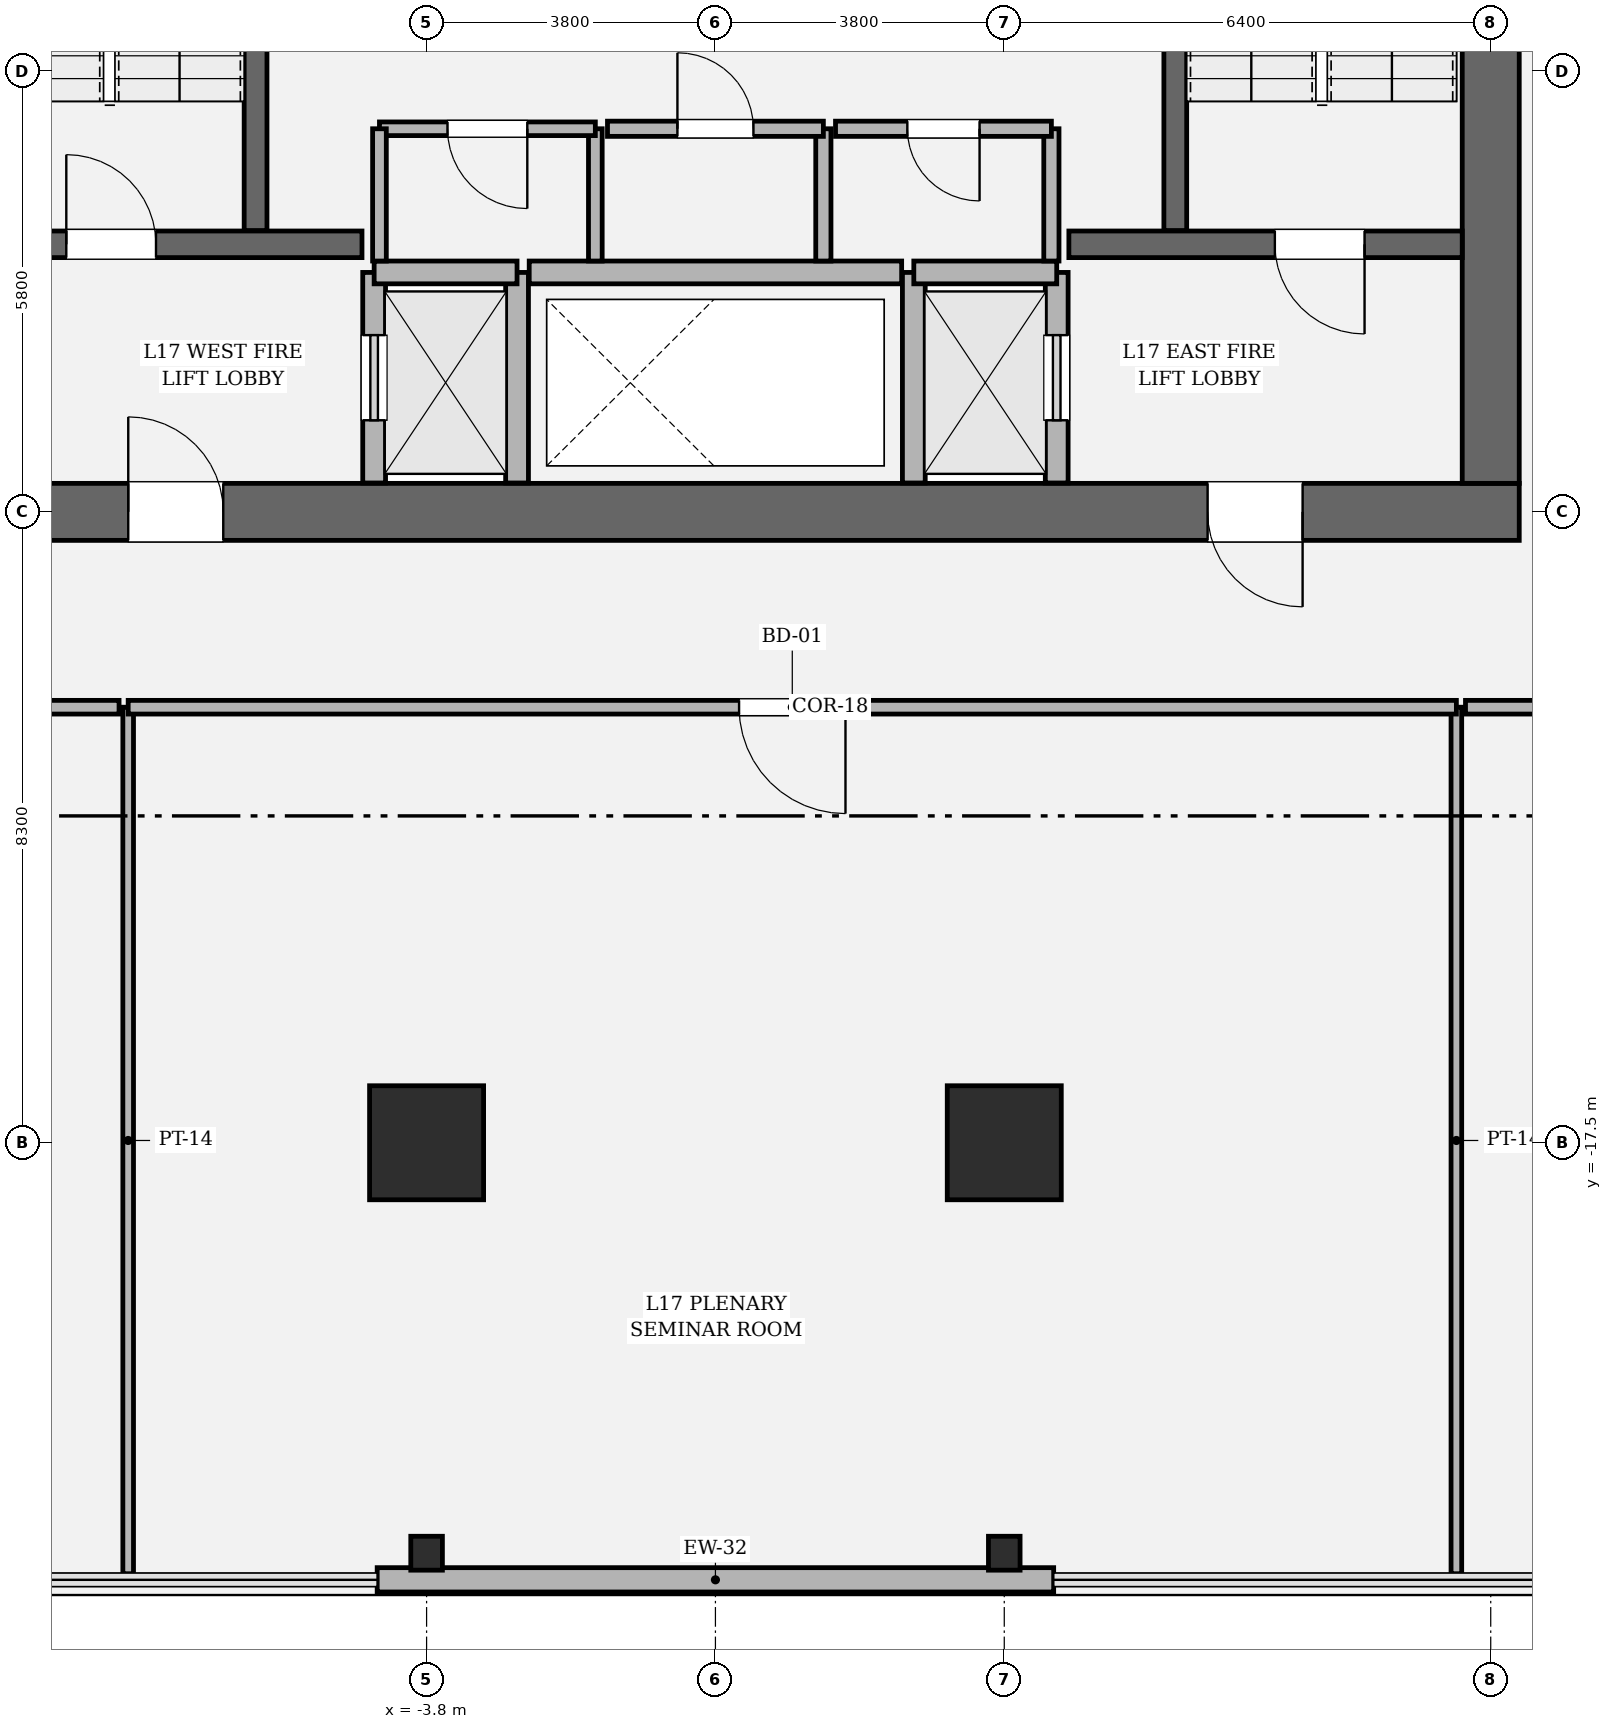
"""IFC4 building model, lengths in metres.
Left out: names, types, materials, properties, quantities, classifications, styles, units other than length and angle.
Written with IfcOpenShell. Run it as: python <this file> out.ifc"""

import sys

from ifc_helpers import new_model, si_unit, direction, frame, frame_2d, origin, origin_2d, place, context, subcontext, project, spatial, rectangle, hollow_rectangle, i_section, extrude, element, fill, save


model = new_model("IFC4")
c1 = context("Model", 3, precision=1e-05, world=origin(), true_north=direction((0.0, 1.0)))
c2 = subcontext(c1, "Body", "Model", "MODEL_VIEW")
j1 = project(units=[si_unit("LENGTHUNIT", "METRE"), si_unit("PLANEANGLEUNIT", "RADIAN")], contexts=[c1])
p1 = place(None, origin())
s1 = spatial("IfcSite", under=j1, at=p1, CompositionType="ELEMENT")
p2 = place(p1, origin())
s2 = spatial("IfcBuilding", under=s1, at=p2, CompositionType="ELEMENT")
p3 = place(p2, frame((0.0, 0.0, 76.8)))
s3 = spatial("IfcBuildingStorey", under=s2, at=p3, CompositionType="ELEMENT", Elevation=76.8)
p4 = place(p3, frame((10.575, -9.2, 0.0), z_axis=(0.0, 0.0, 1.0), x_axis=(-1.0, 0.0, 0.0)))
e1 = element("IfcWall", 1, at=p4, inside=s3, PredefinedType="SHEAR", context=c2, shape_type="SweptSolid", body=[
    extrude(rectangle(XDim=21.15, YDim=0.75, at=frame_2d((10.575, 0.0))), origin(), (0.0, 0.0, 1.0), 4.05),
])
p5 = place(p4, frame((2.85, 0.0, 0.0)))
e2 = element("IfcOpeningElement", 2, at=p5, cuts=e1, PredefinedType="OPENING", context=c2, shape_type="SweptSolid", body=[
    extrude(rectangle(XDim=1.25, YDim=2.25, at=frame_2d((0.625, 1.125))), frame((0.0, 0.385, 0.0), z_axis=(0.0, -1.0, 0.0), x_axis=(1.0, 0.0, 0.0)), (0.0, 0.0, 1.0), 0.77),
])
p6 = place(p4, frame((17.05, 0.0, 0.0)))
e3 = element("IfcOpeningElement", 3, at=p6, cuts=e1, PredefinedType="OPENING", context=c2, shape_type="SweptSolid", body=[
    extrude(rectangle(XDim=1.25, YDim=2.25, at=frame_2d((0.625, 1.125))), frame((0.0, 0.385, 0.0), z_axis=(0.0, -1.0, 0.0), x_axis=(1.0, 0.0, 0.0)), (0.0, 0.0, 1.0), 0.77),
])
p7 = place(p3, frame((10.2, 8.825, 0.0), z_axis=(0.0, 0.0, 1.0), x_axis=(0.0, -1.0, 0.0)))
e4 = element("IfcWall", 4, at=p7, inside=s3, PredefinedType="SHEAR", context=c2, shape_type="SweptSolid", body=[
    extrude(rectangle(XDim=17.65, YDim=0.75, at=frame_2d((8.825, 0.0))), origin(), (0.0, 0.0, 1.0), 4.05),
])
p8 = place(p7, frame((3.855, 0.0, 0.0)))
e5 = element("IfcOpeningElement", 5, at=p8, cuts=e4, PredefinedType="OPENING", context=c2, shape_type="SweptSolid", body=[
    extrude(rectangle(XDim=1.18, YDim=2.2, at=frame_2d((0.59, 1.1))), frame((0.0, 0.385, 0.0), z_axis=(0.0, -1.0, 0.0), x_axis=(1.0, 0.0, 0.0)), (0.0, 0.0, 1.0), 0.77),
])
for number, where, z_axis, x_axis in (
    (6, (-6.05, -5.5, 0.0), (0.0, 0.0, 1.0), (0.0, 1.0, 0.0)),
    (7, (6.05, 3.45, 0.0), (0.0, 0.0, 1.0), (0.0, -1.0, 0.0)),
):
    element("IfcWall", number, at=place(p3, frame(where, z_axis=z_axis, x_axis=x_axis)), inside=s3, PredefinedType="SOLIDWALL", context=c2, shape_type="SweptSolid", body=[
        extrude(rectangle(XDim=8.95, YDim=0.3, at=frame_2d((4.475, 0.0))), origin(), (0.0, 0.0, 1.0), 4.05),
    ])
p9 = place(p3, frame((-9.825, -5.68, 0.0), z_axis=(0.0, 0.0, 1.0), x_axis=(1.0, 0.0, 0.0)))
e8 = element("IfcWall", 8, at=p9, inside=s3, PredefinedType="SOLIDWALL", context=c2, shape_type="SweptSolid", body=[
    extrude(rectangle(XDim=5.175, YDim=0.35, at=frame_2d((2.587, 0.0))), origin(), (0.0, 0.0, 1.0), 4.05),
])
p10 = place(p9, frame((1.285, 0.0, 0.0)))
e9 = element("IfcOpeningElement", 9, at=p10, cuts=e8, PredefinedType="OPENING", context=c2, shape_type="SweptSolid", body=[
    extrude(rectangle(XDim=1.18, YDim=2.2, at=frame_2d((0.59, 1.1))), frame((0.0, 0.185, 0.0), z_axis=(0.0, -1.0, 0.0), x_axis=(1.0, 0.0, 0.0)), (0.0, 0.0, 1.0), 0.37),
])
p11 = place(p3, frame((4.65, -5.68, 0.0), z_axis=(0.0, 0.0, 1.0), x_axis=(1.0, 0.0, 0.0)))
e10 = element("IfcWall", 10, at=p11, inside=s3, PredefinedType="SOLIDWALL", context=c2, shape_type="SweptSolid", body=[
    extrude(rectangle(XDim=5.175, YDim=0.35, at=frame_2d((2.587, 0.0))), origin(), (0.0, 0.0, 1.0), 4.05),
])
p12 = place(p11, frame((2.71, 0.0, 0.0)))
e11 = element("IfcOpeningElement", 11, at=p12, cuts=e10, PredefinedType="OPENING", context=c2, shape_type="SweptSolid", body=[
    extrude(rectangle(XDim=1.18, YDim=2.2, at=frame_2d((0.59, 1.1))), frame((0.0, 0.185, 0.0), z_axis=(0.0, -1.0, 0.0), x_axis=(1.0, 0.0, 0.0)), (0.0, 0.0, 1.0), 0.37),
])
for number, where, z_axis, x_axis in (
    (12, (-3.8, -17.5, 0.0), (0.0, 0.0, 1.0), (1.0, 0.0, 0.0)),
    (13, (3.8, -17.5, 0.0), (0.0, 0.0, 1.0), (1.0, 0.0, 0.0)),
):
    element("IfcColumn", number, at=place(p3, frame(where, z_axis=z_axis, x_axis=x_axis)), inside=s3, PredefinedType="COLUMN", context=c2, shape_type="SweptSolid", body=[
        extrude(hollow_rectangle(XDim=1.5, YDim=1.5, WallThickness=0.045, at=origin_2d()), origin(), (0.0, 0.0, 1.0), 4.05),
    ])
for number, where, z_axis, x_axis in (
    (14, (-3.8, -22.9, 0.0), (0.0, 0.0, 1.0), (1.0, 0.0, 0.0)),
    (15, (3.8, -22.9, 0.0), (0.0, 0.0, 1.0), (1.0, 0.0, 0.0)),
):
    element("IfcColumn", number, at=place(p3, frame(where, z_axis=z_axis, x_axis=x_axis)), inside=s3, PredefinedType="COLUMN", context=c2, shape_type="SweptSolid", body=[
        extrude(i_section(OverallWidth=0.416, OverallDepth=0.446, WebThickness=0.039, FlangeThickness=0.062, FilletRadius=0.018, at=origin_2d()), origin(), (0.0, 0.0, 1.0), 4.048),
    ])
p13 = place(p3, frame((-4.45, -23.25, 0.0), z_axis=(0.0, 0.0, 1.0), x_axis=(1.0, 0.0, 0.0)))
e16 = element("IfcWall", 16, at=p13, inside=s3, PredefinedType="SOLIDWALL", context=c2, shape_type="SweptSolid", body=[
    extrude(rectangle(XDim=8.9, YDim=0.32, at=frame_2d((4.45, 0.0))), origin(), (0.0, 0.0, 1.0), 2.524),
])
p14 = place(p3, frame((-4.49, -8.82, 0.0), z_axis=(0.0, 0.0, 1.0), x_axis=(0.0, 1.0, 0.0)))
e17 = element("IfcWall", 17, at=p14, inside=s3, PredefinedType="SOLIDWALL", context=c2, shape_type="SweptSolid", body=[
    extrude(rectangle(XDim=2.77, YDim=0.3, at=frame_2d((1.385, 0.0))), origin(), (0.0, 0.0, 1.0), 3.81),
])
p15 = place(p14, frame((0.825, 0.0, 0.0)))
e18 = element("IfcOpeningElement", 18, at=p15, cuts=e17, PredefinedType="OPENING", context=c2, shape_type="SweptSolid", body=[
    extrude(rectangle(XDim=1.12, YDim=2.25, at=frame_2d((0.56, 1.125))), frame((0.0, 0.16, 0.0), z_axis=(0.0, -1.0, 0.0), x_axis=(1.0, 0.0, 0.0)), (0.0, 0.0, 1.0), 0.32),
])
p16 = place(p3, frame((-2.61, -8.82, 0.0), z_axis=(0.0, 0.0, 1.0), x_axis=(0.0, 1.0, 0.0)))
e19 = element("IfcWall", 19, at=p16, inside=s3, PredefinedType="SOLIDWALL", context=c2, shape_type="SweptSolid", body=[
    extrude(rectangle(XDim=2.77, YDim=0.3, at=frame_2d((1.385, 0.0))), origin(), (0.0, 0.0, 1.0), 3.81),
])
p17 = place(p3, frame((-4.49, -6.05, 0.0), z_axis=(0.0, 0.0, 1.0), x_axis=(1.0, 0.0, 0.0)))
e20 = element("IfcWall", 20, at=p17, inside=s3, PredefinedType="SOLIDWALL", context=c2, shape_type="SweptSolid", body=[
    extrude(rectangle(XDim=1.88, YDim=0.3, at=frame_2d((0.94, 0.0))), origin(), (0.0, 0.0, 1.0), 3.81),
])
p18 = place(p3, frame((4.49, -8.82, 0.0), z_axis=(0.0, 0.0, 1.0), x_axis=(0.0, 1.0, 0.0)))
e21 = element("IfcWall", 21, at=p18, inside=s3, PredefinedType="SOLIDWALL", context=c2, shape_type="SweptSolid", body=[
    extrude(rectangle(XDim=2.77, YDim=0.3, at=frame_2d((1.385, 0.0))), origin(), (0.0, 0.0, 1.0), 3.81),
])
p19 = place(p18, frame((0.825, 0.0, 0.0)))
e22 = element("IfcOpeningElement", 22, at=p19, cuts=e21, PredefinedType="OPENING", context=c2, shape_type="SweptSolid", body=[
    extrude(rectangle(XDim=1.12, YDim=2.25, at=frame_2d((0.56, 1.125))), frame((0.0, 0.16, 0.0), z_axis=(0.0, -1.0, 0.0), x_axis=(1.0, 0.0, 0.0)), (0.0, 0.0, 1.0), 0.32),
])
p20 = place(p3, frame((2.61, -8.82, 0.0), z_axis=(0.0, 0.0, 1.0), x_axis=(0.0, 1.0, 0.0)))
e23 = element("IfcWall", 23, at=p20, inside=s3, PredefinedType="SOLIDWALL", context=c2, shape_type="SweptSolid", body=[
    extrude(rectangle(XDim=2.77, YDim=0.3, at=frame_2d((1.385, 0.0))), origin(), (0.0, 0.0, 1.0), 3.81),
])
p21 = place(p3, frame((2.61, -6.05, 0.0), z_axis=(0.0, 0.0, 1.0), x_axis=(1.0, 0.0, 0.0)))
e24 = element("IfcWall", 24, at=p21, inside=s3, PredefinedType="SOLIDWALL", context=c2, shape_type="SweptSolid", body=[
    extrude(rectangle(XDim=1.88, YDim=0.3, at=frame_2d((0.94, 0.0))), origin(), (0.0, 0.0, 1.0), 3.81),
])
p22 = place(p3, frame((-2.45, -6.05, 0.0), z_axis=(0.0, 0.0, 1.0), x_axis=(1.0, 0.0, 0.0)))
e25 = element("IfcWall", 25, at=p22, inside=s3, PredefinedType="SOLIDWALL", context=c2, shape_type="SweptSolid", body=[
    extrude(rectangle(XDim=4.9, YDim=0.3, at=frame_2d((2.45, 0.0))), origin(), (0.0, 0.0, 1.0), 3.81),
])
p23 = place(p3, frame((-1.58, -5.9, 0.0), z_axis=(0.0, 0.0, 1.0), x_axis=(0.0, 1.0, 0.0)))
e26 = element("IfcWall", 26, at=p23, inside=s3, PredefinedType="PARTITIONING", context=c2, shape_type="SweptSolid", body=[
    extrude(rectangle(XDim=1.74, YDim=0.18, at=frame_2d((0.87, 0.0))), origin(), (0.0, 0.0, 1.0), 3.81),
])
p24 = place(p3, frame((-1.58, -4.16, 0.0), z_axis=(0.0, 0.0, 1.0), x_axis=(-1.0, 0.0, 0.0)))
e27 = element("IfcWall", 27, at=p24, inside=s3, PredefinedType="PARTITIONING", context=c2, shape_type="SweptSolid", body=[
    extrude(rectangle(XDim=2.84, YDim=0.18, at=frame_2d((1.42, 0.0))), origin(), (0.0, 0.0, 1.0), 3.81),
])
p25 = place(p24, frame((0.895, 0.0, 0.0)))
e28 = element("IfcOpeningElement", 28, at=p25, cuts=e27, PredefinedType="OPENING", context=c2, shape_type="SweptSolid", body=[
    extrude(rectangle(XDim=1.05, YDim=2.2, at=frame_2d((0.525, 1.1))), frame((0.0, 0.1, 0.0), z_axis=(0.0, -1.0, 0.0), x_axis=(1.0, 0.0, 0.0)), (0.0, 0.0, 1.0), 0.2),
])
p26 = place(p3, frame((-4.42, -4.16, 0.0), z_axis=(0.0, 0.0, 1.0), x_axis=(0.0, -1.0, 0.0)))
e29 = element("IfcWall", 29, at=p26, inside=s3, PredefinedType="PARTITIONING", context=c2, shape_type="SweptSolid", body=[
    extrude(rectangle(XDim=1.74, YDim=0.18, at=frame_2d((0.87, 0.0))), origin(), (0.0, 0.0, 1.0), 3.81),
])
p27 = place(p3, frame((1.42, -5.9, 0.0), z_axis=(0.0, 0.0, 1.0), x_axis=(0.0, 1.0, 0.0)))
e30 = element("IfcWall", 30, at=p27, inside=s3, PredefinedType="SOLIDWALL", context=c2, shape_type="SweptSolid", body=[
    extrude(rectangle(XDim=1.74, YDim=0.2, at=frame_2d((0.87, 0.0))), origin(), (0.0, 0.0, 1.0), 3.81),
])
p28 = place(p3, frame((1.42, -4.16, 0.0), z_axis=(0.0, 0.0, 1.0), x_axis=(-1.0, 0.0, 0.0)))
e31 = element("IfcWall", 31, at=p28, inside=s3, PredefinedType="SOLIDWALL", context=c2, shape_type="SweptSolid", body=[
    extrude(rectangle(XDim=2.84, YDim=0.2, at=frame_2d((1.42, 0.0))), origin(), (0.0, 0.0, 1.0), 3.81),
])
p29 = place(p28, frame((0.92, 0.0, 0.0)))
e32 = element("IfcOpeningElement", 32, at=p29, cuts=e31, PredefinedType="OPENING", context=c2, shape_type="SweptSolid", body=[
    extrude(rectangle(XDim=1.0, YDim=2.15, at=frame_2d((0.5, 1.075))), frame((0.0, 0.11, 0.0), z_axis=(0.0, -1.0, 0.0), x_axis=(1.0, 0.0, 0.0)), (0.0, 0.0, 1.0), 0.22),
])
p30 = place(p3, frame((4.42, -5.9, 0.0), z_axis=(0.0, 0.0, 1.0), x_axis=(0.0, 1.0, 0.0)))
e33 = element("IfcWall", 33, at=p30, inside=s3, PredefinedType="SOLIDWALL", context=c2, shape_type="SweptSolid", body=[
    extrude(rectangle(XDim=1.74, YDim=0.2, at=frame_2d((0.87, 0.0))), origin(), (0.0, 0.0, 1.0), 3.81),
])
p31 = place(p3, frame((4.42, -4.16, 0.0), z_axis=(0.0, 0.0, 1.0), x_axis=(-1.0, 0.0, 0.0)))
e34 = element("IfcWall", 34, at=p31, inside=s3, PredefinedType="SOLIDWALL", context=c2, shape_type="SweptSolid", body=[
    extrude(rectangle(XDim=2.84, YDim=0.2, at=frame_2d((1.42, 0.0))), origin(), (0.0, 0.0, 1.0), 3.81),
])
p32 = place(p31, frame((0.945, 0.0, 0.0)))
e35 = element("IfcOpeningElement", 35, at=p32, cuts=e34, PredefinedType="OPENING", context=c2, shape_type="SweptSolid", body=[
    extrude(rectangle(XDim=0.95, YDim=2.15, at=frame_2d((0.475, 1.075))), frame((0.0, 0.11, 0.0), z_axis=(0.0, -1.0, 0.0), x_axis=(1.0, 0.0, 0.0)), (0.0, 0.0, 1.0), 0.22),
])
for number, where, z_axis, x_axis in (
    (36, (9.748, -11.77, 0.0), (0.0, 0.0, 1.0), (0.0, -1.0, 0.0)),
    (37, (-7.726, -23.17, 0.0), (0.0, 0.0, 1.0), (0.0, 1.0, 0.0)),
):
    element("IfcWall", number, at=place(p3, frame(where, z_axis=z_axis, x_axis=x_axis)), inside=s3, PredefinedType="PARTITIONING", context=c2, shape_type="SweptSolid", body=[
        extrude(rectangle(XDim=11.4, YDim=0.14, at=frame_2d((5.7, 0.0))), origin(), (0.0, 0.0, 1.0), 2.524),
    ])
p33 = place(p3, frame((-7.726, -11.77, 0.0), z_axis=(0.0, 0.0, 1.0), x_axis=(1.0, 0.0, 0.0)))
e38 = element("IfcWall", 38, at=p33, inside=s3, PredefinedType="PARTITIONING", context=c2, shape_type="SweptSolid", body=[
    extrude(rectangle(XDim=17.474, YDim=0.18, at=frame_2d((8.737, 0.0))), origin(), (0.0, 0.0, 1.0), 3.104),
])
p34 = place(p33, frame((8.037, 0.0, 0.0)))
e39 = element("IfcOpeningElement", 39, at=p34, cuts=e38, PredefinedType="OPENING", context=c2, shape_type="SweptSolid", body=[
    extrude(rectangle(XDim=1.4, YDim=2.25, at=frame_2d((0.7, 1.125))), frame((0.0, 0.1, 0.0), z_axis=(0.0, -1.0, 0.0), x_axis=(1.0, 0.0, 0.0)), (0.0, 0.0, 1.0), 0.2),
])
p35 = place(p3, frame((-12.77, -11.77, 0.0), z_axis=(0.0, 0.0, 1.0), x_axis=(1.0, 0.0, 0.0)))
e40 = element("IfcWall", 40, at=p35, inside=s3, PredefinedType="PARTITIONING", context=c2, shape_type="SweptSolid", body=[
    extrude(rectangle(XDim=4.924, YDim=0.18, at=frame_2d((2.462, 0.0))), origin(), (0.0, 0.0, 1.0), 3.104),
])
p36 = place(p35, frame((1.762, 0.0, 0.0)))
e41 = element("IfcOpeningElement", 41, at=p36, cuts=e40, PredefinedType="OPENING", context=c2, shape_type="SweptSolid", body=[
    extrude(rectangle(XDim=1.4, YDim=2.25, at=frame_2d((0.7, 1.125))), frame((0.0, 0.1, 0.0), z_axis=(0.0, -1.0, 0.0), x_axis=(1.0, 0.0, 0.0)), (0.0, 0.0, 1.0), 0.2),
])
p37 = place(p3, frame((9.868, -11.77, 0.0), z_axis=(0.0, 0.0, 1.0), x_axis=(1.0, 0.0, 0.0)))
e42 = element("IfcWall", 42, at=p37, inside=s3, PredefinedType="PARTITIONING", context=c2, shape_type="SweptSolid", body=[
    extrude(rectangle(XDim=6.402, YDim=0.18, at=frame_2d((3.201, 0.0))), origin(), (0.0, 0.0, 1.0), 3.104),
])
p38 = place(p37, frame((2.501, 0.0, 0.0)))
e43 = element("IfcOpeningElement", 43, at=p38, cuts=e42, PredefinedType="OPENING", context=c2, shape_type="SweptSolid", body=[
    extrude(rectangle(XDim=1.4, YDim=2.25, at=frame_2d((0.7, 1.125))), frame((0.0, 0.1, 0.0), z_axis=(0.0, -1.0, 0.0), x_axis=(1.0, 0.0, 0.0)), (0.0, 0.0, 1.0), 0.2),
])
p39 = place(p10, origin())
e44 = element("IfcDoor", 44, at=p39, inside=s3, OperationType="SINGLE_SWING_LEFT", PredefinedType="DOOR", context=c2, shape_type="SweptSolid", body=[
    extrude(rectangle(XDim=1.18, YDim=2.2, at=frame_2d((0.59, 1.1))), frame((0.0, 0.025, 0.0), z_axis=(0.0, -1.0, 0.0), x_axis=(1.0, 0.0, 0.0)), (0.0, 0.0, 1.0), 0.05),
])
fill(e9, e44)
p40 = place(p12, origin())
e45 = element("IfcDoor", 45, at=p40, inside=s3, OperationType="SINGLE_SWING_RIGHT", PredefinedType="DOOR", context=c2, shape_type="SweptSolid", body=[
    extrude(rectangle(XDim=1.18, YDim=2.2, at=frame_2d((0.59, 1.1))), frame((0.0, 0.025, 0.0), z_axis=(0.0, -1.0, 0.0), x_axis=(1.0, 0.0, 0.0)), (0.0, 0.0, 1.0), 0.05),
])
fill(e11, e45)
p41 = place(p5, origin())
e46 = element("IfcDoor", 46, at=p41, inside=s3, OperationType="SINGLE_SWING_LEFT", PredefinedType="DOOR", context=c2, shape_type="SweptSolid", body=[
    extrude(rectangle(XDim=1.25, YDim=2.25, at=frame_2d((0.625, 1.125))), frame((0.0, 0.025, 0.0), z_axis=(0.0, -1.0, 0.0), x_axis=(1.0, 0.0, 0.0)), (0.0, 0.0, 1.0), 0.05),
])
fill(e2, e46)
p42 = place(p6, origin())
e47 = element("IfcDoor", 47, at=p42, inside=s3, OperationType="SINGLE_SWING_RIGHT", PredefinedType="DOOR", context=c2, shape_type="SweptSolid", body=[
    extrude(rectangle(XDim=1.25, YDim=2.25, at=frame_2d((0.625, 1.125))), frame((0.0, 0.025, 0.0), z_axis=(0.0, -1.0, 0.0), x_axis=(1.0, 0.0, 0.0)), (0.0, 0.0, 1.0), 0.05),
])
fill(e3, e47)
p43 = place(p15, origin())
e48 = element("IfcDoor", 48, at=p43, inside=s3, OperationType="SLIDING_TO_LEFT", PredefinedType="DOOR", context=c2, shape_type="SweptSolid", body=[
    extrude(rectangle(XDim=1.12, YDim=2.25, at=frame_2d((0.56, 1.125))), frame((0.0, 0.025, 0.0), z_axis=(0.0, -1.0, 0.0), x_axis=(1.0, 0.0, 0.0)), (0.0, 0.0, 1.0), 0.05),
])
fill(e18, e48)
p44 = place(p19, origin())
e49 = element("IfcDoor", 49, at=p44, inside=s3, OperationType="SLIDING_TO_RIGHT", PredefinedType="DOOR", context=c2, shape_type="SweptSolid", body=[
    extrude(rectangle(XDim=1.12, YDim=2.25, at=frame_2d((0.56, 1.125))), frame((0.0, 0.025, 0.0), z_axis=(0.0, -1.0, 0.0), x_axis=(1.0, 0.0, 0.0)), (0.0, 0.0, 1.0), 0.05),
])
fill(e22, e49)
p45 = place(p25, origin())
e50 = element("IfcDoor", 50, at=p45, inside=s3, OperationType="SINGLE_SWING_LEFT", PredefinedType="DOOR", context=c2, shape_type="SweptSolid", body=[
    extrude(rectangle(XDim=1.05, YDim=2.2, at=frame_2d((0.525, 1.1))), frame((0.0, 0.025, 0.0), z_axis=(0.0, -1.0, 0.0), x_axis=(1.0, 0.0, 0.0)), (0.0, 0.0, 1.0), 0.05),
])
fill(e28, e50)
p46 = place(p29, origin())
e51 = element("IfcDoor", 51, at=p46, inside=s3, OperationType="SINGLE_SWING_RIGHT", PredefinedType="DOOR", context=c2, shape_type="SweptSolid", body=[
    extrude(rectangle(XDim=1.0, YDim=2.15, at=frame_2d((0.5, 1.075))), frame((0.0, 0.025, 0.0), z_axis=(0.0, -1.0, 0.0), x_axis=(1.0, 0.0, 0.0)), (0.0, 0.0, 1.0), 0.05),
])
fill(e32, e51)
p47 = place(p32, origin())
e52 = element("IfcDoor", 52, at=p47, inside=s3, OperationType="SINGLE_SWING_LEFT", PredefinedType="DOOR", context=c2, shape_type="SweptSolid", body=[
    extrude(rectangle(XDim=0.95, YDim=2.15, at=frame_2d((0.475, 1.075))), frame((0.0, 0.025, 0.0), z_axis=(0.0, -1.0, 0.0), x_axis=(1.0, 0.0, 0.0)), (0.0, 0.0, 1.0), 0.05),
])
fill(e35, e52)
p48 = place(p34, origin())
e53 = element("IfcDoor", 53, at=p48, inside=s3, OperationType="SINGLE_SWING_RIGHT", PredefinedType="DOOR", context=c2, shape_type="SweptSolid", body=[
    extrude(rectangle(XDim=1.4, YDim=2.25, at=frame_2d((0.7, 1.125))), frame((0.0, 0.025, 0.0), z_axis=(0.0, -1.0, 0.0), x_axis=(1.0, 0.0, 0.0)), (0.0, 0.0, 1.0), 0.05),
])
fill(e39, e53)
save(model, sys.argv[1])
